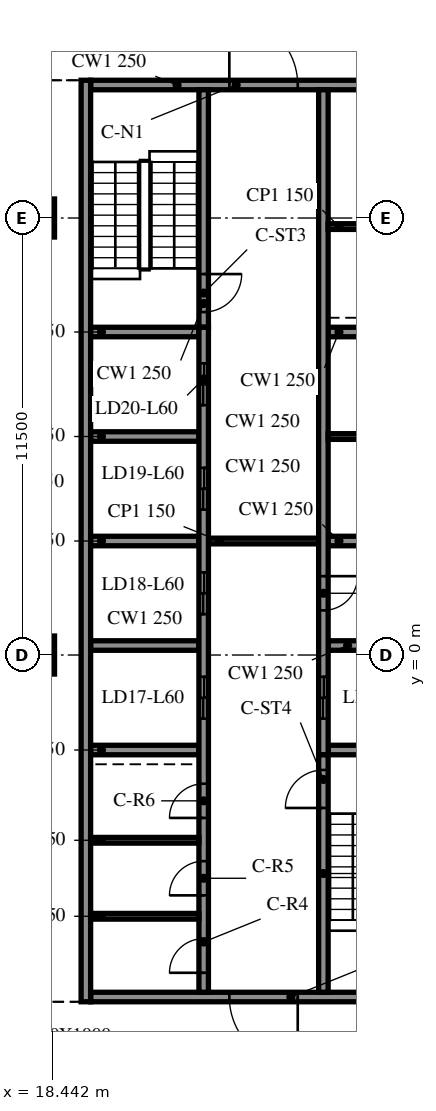
"""IFC4 building model, lengths in metres.
Left out: names, types, materials, properties, quantities, classifications, styles, units other than length and angle.
Written with IfcOpenShell. Run it as: python <this file> out.ifc"""

import sys

from ifc_helpers import new_model, si_unit, direction, frame, frame_2d, origin, origin_2d, place, context, subcontext, project, spatial, rectangle, extrude, element, fill, save


model = new_model("IFC4")
c1 = context("Model", 3, precision=1e-05, world=origin(), true_north=direction((0.0, 1.0)))
c2 = subcontext(c1, "Body", "Model", "MODEL_VIEW")
j1 = project(units=[si_unit("LENGTHUNIT", "METRE"), si_unit("PLANEANGLEUNIT", "RADIAN")], contexts=[c1])
p1 = place(None, origin())
s1 = spatial("IfcSite", under=j1, at=p1, CompositionType="ELEMENT")
p2 = place(p1, origin())
s2 = spatial("IfcBuilding", under=s1, at=p2, CompositionType="ELEMENT")
p3 = place(p2, frame((0.0, 0.0, 247.6)))
s3 = spatial("IfcBuildingStorey", under=s2, at=p3, CompositionType="ELEMENT", Elevation=247.6)
for number, where, z_axis, x_axis in (
    (1, (18.0, 0.0, -0.34), (0.0, 0.0, 1.0), (1.0, 0.0, 0.0)),
    (2, (18.0, 11.5, -0.34), (0.0, 0.0, 1.0), (1.0, 0.0, 0.0)),
):
    element("IfcColumn", number, at=place(p3, frame(where, z_axis=z_axis, x_axis=x_axis)), inside=s3, PredefinedType="COLUMN", context=c2, shape_type="SweptSolid", body=[
        extrude(rectangle(XDim=1.0, YDim=1.0, at=origin_2d()), origin(), (0.0, 0.0, 1.0), 3.8),
    ])
p4 = place(p3, frame((19.325, 15.125, 0.0), z_axis=(0.0, 0.0, 1.0), x_axis=(0.0, -1.0, 0.0)))
e3 = element("IfcWall", 3, at=p4, inside=s3, PredefinedType="SOLIDWALL", context=c2, shape_type="SweptSolid", body=[
    extrude(rectangle(XDim=24.25, YDim=0.25, at=frame_2d((12.125, 0.0))), origin(), (0.0, 0.0, 1.0), 3.46),
])
p5 = place(p3, frame((28.55, -9.0, 0.0), z_axis=(0.0, 0.0, 1.0), x_axis=(-1.0, 0.0, 0.0)))
e4 = element("IfcWall", 4, at=p5, inside=s3, PredefinedType="SOLIDWALL", context=c2, shape_type="SweptSolid", body=[
    extrude(rectangle(XDim=9.1, YDim=0.25, at=frame_2d((4.55, 0.0))), origin(), (0.0, 0.0, 1.0), 3.46),
])
p6 = place(p5, frame((3.65, 0.0, 0.0)))
e5 = element("IfcOpeningElement", 5, at=p6, cuts=e4, PredefinedType="OPENING", context=c2, shape_type="SweptSolid", body=[
    extrude(rectangle(XDim=1.8, YDim=2.1, at=frame_2d((0.9, 1.05))), frame((0.0, 0.135, 0.0), z_axis=(0.0, -1.0, 0.0), x_axis=(1.0, 0.0, 0.0)), (0.0, 0.0, 1.0), 0.27),
])
p7 = place(p3, frame((19.45, 15.0, 0.0), z_axis=(0.0, 0.0, 1.0), x_axis=(1.0, 0.0, 0.0)))
e6 = element("IfcWall", 6, at=p7, inside=s3, PredefinedType="SOLIDWALL", context=c2, shape_type="SweptSolid", body=[
    extrude(rectangle(XDim=9.1, YDim=0.25, at=frame_2d((4.55, 0.0))), origin(), (0.0, 0.0, 1.0), 3.46),
])
p8 = place(p7, frame((3.65, 0.0, 0.0)))
e7 = element("IfcOpeningElement", 7, at=p8, cuts=e6, PredefinedType="OPENING", context=c2, shape_type="SweptSolid", body=[
    extrude(rectangle(XDim=1.8, YDim=2.1, at=frame_2d((0.9, 1.05))), frame((0.0, 0.135, 0.0), z_axis=(0.0, -1.0, 0.0), x_axis=(1.0, 0.0, 0.0)), (0.0, 0.0, 1.0), 0.27),
])
p9 = place(p3, frame((22.425, -8.875, 0.0), z_axis=(0.0, 0.0, 1.0), x_axis=(0.0, 1.0, 0.0)))
e8 = element("IfcWall", 8, at=p9, inside=s3, PredefinedType="SOLIDWALL", context=c2, shape_type="SweptSolid", body=[
    extrude(rectangle(XDim=17.5, YDim=0.25, at=frame_2d((8.75, 0.0))), origin(), (0.0, 0.0, 1.0), 3.46),
])
p10 = place(p9, frame((7.2, 0.0, 0.0)))
e9 = element("IfcOpeningElement", 9, at=p10, cuts=e8, PredefinedType="OPENING", context=c2, shape_type="SweptSolid", body=[
    extrude(rectangle(XDim=1.1, YDim=2.1, at=frame_2d((0.55, 1.05))), frame((0.0, 0.135, 0.0), z_axis=(0.0, -1.0, 0.0), x_axis=(1.0, 0.0, 0.0)), (0.0, 0.0, 1.0), 0.27),
])
p11 = place(p9, frame((9.95, 0.0, 0.0)))
e10 = element("IfcOpeningElement", 10, at=p11, cuts=e8, PredefinedType="OPENING", context=c2, shape_type="SweptSolid", body=[
    extrude(rectangle(XDim=1.1, YDim=2.1, at=frame_2d((0.55, 1.05))), frame((0.0, 0.135, 0.0), z_axis=(0.0, -1.0, 0.0), x_axis=(1.0, 0.0, 0.0)), (0.0, 0.0, 1.0), 0.27),
])
p12 = place(p9, frame((12.7, 0.0, 0.0)))
e11 = element("IfcOpeningElement", 11, at=p12, cuts=e8, PredefinedType="OPENING", context=c2, shape_type="SweptSolid", body=[
    extrude(rectangle(XDim=1.1, YDim=2.1, at=frame_2d((0.55, 1.05))), frame((0.0, 0.135, 0.0), z_axis=(0.0, -1.0, 0.0), x_axis=(1.0, 0.0, 0.0)), (0.0, 0.0, 1.0), 0.27),
])
p13 = place(p9, frame((15.45, 0.0, 0.0)))
e12 = element("IfcOpeningElement", 12, at=p13, cuts=e8, PredefinedType="OPENING", context=c2, shape_type="SweptSolid", body=[
    extrude(rectangle(XDim=1.1, YDim=2.1, at=frame_2d((0.55, 1.05))), frame((0.0, 0.135, 0.0), z_axis=(0.0, -1.0, 0.0), x_axis=(1.0, 0.0, 0.0)), (0.0, 0.0, 1.0), 0.27),
])
p14 = place(p9, frame((0.512, 0.0, 0.0)))
e13 = element("IfcOpeningElement", 13, at=p14, cuts=e8, PredefinedType="OPENING", context=c2, shape_type="SweptSolid", body=[
    extrude(rectangle(XDim=0.9, YDim=2.1, at=frame_2d((0.45, 1.05))), frame((0.0, 0.135, 0.0), z_axis=(0.0, -1.0, 0.0), x_axis=(1.0, 0.0, 0.0)), (0.0, 0.0, 1.0), 0.27),
])
p15 = place(p9, frame((2.55, 0.0, 0.0)))
e14 = element("IfcOpeningElement", 14, at=p15, cuts=e8, PredefinedType="OPENING", context=c2, shape_type="SweptSolid", body=[
    extrude(rectangle(XDim=0.9, YDim=2.1, at=frame_2d((0.45, 1.05))), frame((0.0, 0.135, 0.0), z_axis=(0.0, -1.0, 0.0), x_axis=(1.0, 0.0, 0.0)), (0.0, 0.0, 1.0), 0.27),
])
p16 = place(p9, frame((4.587, 0.0, 0.0)))
e15 = element("IfcOpeningElement", 15, at=p16, cuts=e8, PredefinedType="OPENING", context=c2, shape_type="SweptSolid", body=[
    extrude(rectangle(XDim=0.9, YDim=2.1, at=frame_2d((0.45, 1.05))), frame((0.0, 0.135, 0.0), z_axis=(0.0, -1.0, 0.0), x_axis=(1.0, 0.0, 0.0)), (0.0, 0.0, 1.0), 0.27),
])
p17 = place(p3, frame((22.425, 14.875, 0.0), z_axis=(0.0, 0.0, 1.0), x_axis=(0.0, -1.0, 0.0)))
e16 = element("IfcWall", 16, at=p17, inside=s3, PredefinedType="SOLIDWALL", context=c2, shape_type="SweptSolid", body=[
    extrude(rectangle(XDim=6.25, YDim=0.25, at=frame_2d((3.125, 0.0))), origin(), (0.0, 0.0, 1.0), 3.46),
])
p18 = place(p17, frame((4.85, 0.0, 0.0)))
e17 = element("IfcOpeningElement", 17, at=p18, cuts=e16, PredefinedType="OPENING", context=c2, shape_type="SweptSolid", body=[
    extrude(rectangle(XDim=1.0, YDim=2.1, at=frame_2d((0.5, 1.05))), frame((0.0, 0.135, 0.0), z_axis=(0.0, -1.0, 0.0), x_axis=(1.0, 0.0, 0.0)), (0.0, 0.0, 1.0), 0.27),
])
p19 = place(p3, frame((25.575, -8.875, 0.0), z_axis=(0.0, 0.0, 1.0), x_axis=(0.0, 1.0, 0.0)))
e18 = element("IfcWall", 18, at=p19, inside=s3, PredefinedType="SOLIDWALL", context=c2, shape_type="SweptSolid", body=[
    extrude(rectangle(XDim=6.25, YDim=0.25, at=frame_2d((3.125, 0.0))), origin(), (0.0, 0.0, 1.0), 3.46),
])
p20 = place(p19, frame((4.85, 0.0, 0.0)))
e19 = element("IfcOpeningElement", 19, at=p20, cuts=e18, PredefinedType="OPENING", context=c2, shape_type="SweptSolid", body=[
    extrude(rectangle(XDim=1.0, YDim=2.1, at=frame_2d((0.5, 1.05))), frame((0.0, 0.135, 0.0), z_axis=(0.0, -1.0, 0.0), x_axis=(1.0, 0.0, 0.0)), (0.0, 0.0, 1.0), 0.27),
])
p21 = place(p3, frame((25.575, 14.875, 0.0), z_axis=(0.0, 0.0, 1.0), x_axis=(0.0, -1.0, 0.0)))
e20 = element("IfcWall", 20, at=p21, inside=s3, PredefinedType="SOLIDWALL", context=c2, shape_type="SweptSolid", body=[
    extrude(rectangle(XDim=17.5, YDim=0.25, at=frame_2d((8.75, 0.0))), origin(), (0.0, 0.0, 1.0), 3.46),
])
p22 = place(p21, frame((15.45, 0.0, 0.0)))
e21 = element("IfcOpeningElement", 21, at=p22, cuts=e20, PredefinedType="OPENING", context=c2, shape_type="SweptSolid", body=[
    extrude(rectangle(XDim=1.1, YDim=2.1, at=frame_2d((0.55, 1.05))), frame((0.0, 0.135, 0.0), z_axis=(0.0, -1.0, 0.0), x_axis=(1.0, 0.0, 0.0)), (0.0, 0.0, 1.0), 0.27),
])
p23 = place(p21, frame((12.8, 0.0, 0.0)))
e22 = element("IfcOpeningElement", 22, at=p23, cuts=e20, PredefinedType="OPENING", context=c2, shape_type="SweptSolid", body=[
    extrude(rectangle(XDim=0.9, YDim=2.1, at=frame_2d((0.45, 1.05))), frame((0.0, 0.135, 0.0), z_axis=(0.0, -1.0, 0.0), x_axis=(1.0, 0.0, 0.0)), (0.0, 0.0, 1.0), 0.27),
])
for number, where, z_axis, x_axis in (
    (23, (19.45, -2.5, 0.0), (0.0, 0.0, 1.0), (1.0, 0.0, 0.0)),
    (24, (19.45, 0.25, 0.0), (0.0, 0.0, 1.0), (1.0, 0.0, 0.0)),
    (25, (19.45, 3.0, 0.0), (0.0, 0.0, 1.0), (1.0, 0.0, 0.0)),
    (26, (19.45, 5.75, 0.0), (0.0, 0.0, 1.0), (1.0, 0.0, 0.0)),
    (27, (19.45, 8.5, 0.0), (0.0, 0.0, 1.0), (1.0, 0.0, 0.0)),
    (28, (25.7, -2.5, 0.0), (0.0, 0.0, 1.0), (1.0, 0.0, 0.0)),
    (29, (25.7, 0.25, 0.0), (0.0, 0.0, 1.0), (1.0, 0.0, 0.0)),
    (30, (25.7, 3.0, 0.0), (0.0, 0.0, 1.0), (1.0, 0.0, 0.0)),
    (31, (25.7, 8.5, 0.0), (0.0, 0.0, 1.0), (1.0, 0.0, 0.0)),
):
    element("IfcWall", number, at=place(p3, frame(where, z_axis=z_axis, x_axis=x_axis)), inside=s3, PredefinedType="SOLIDWALL", context=c2, shape_type="SweptSolid", body=[
        extrude(rectangle(XDim=2.85, YDim=0.25, at=frame_2d((1.425, 0.0))), origin(), (0.0, 0.0, 1.0), 3.46),
    ])
p24 = place(p3, frame((22.55, 3.0, 0.0), z_axis=(0.0, 0.0, 1.0), x_axis=(1.0, 0.0, 0.0)))
e32 = element("IfcWall", 32, at=p24, inside=s3, PredefinedType="PARTITIONING", context=c2, shape_type="SweptSolid", body=[
    extrude(rectangle(XDim=2.9, YDim=0.15, at=frame_2d((1.45, 0.0))), origin(), (0.0, 0.0, 1.0), 3.46),
])
for number, where, z_axis, x_axis in (
    (33, (25.7, 5.75, 0.0), (0.0, 0.0, 1.0), (1.0, 0.0, 0.0)),
    (34, (19.45, -6.875, 0.0), (0.0, 0.0, 1.0), (1.0, 0.0, 0.0)),
    (35, (19.45, -4.875, 0.0), (0.0, 0.0, 1.0), (1.0, 0.0, 0.0)),
    (36, (25.7, 11.275, 0.0), (0.0, 0.0, 1.0), (1.0, 0.0, 0.0)),
):
    element("IfcWall", number, at=place(p3, frame(where, z_axis=z_axis, x_axis=x_axis)), inside=s3, PredefinedType="PARTITIONING", context=c2, shape_type="SweptSolid", body=[
        extrude(rectangle(XDim=2.85, YDim=0.15, at=frame_2d((1.425, 0.0))), origin(), (0.0, 0.0, 1.0), 3.46),
    ])
p25 = place(p6, origin())
e37 = element("IfcDoor", 37, at=p25, inside=s3, OperationType="DOUBLE_DOOR_SINGLE_SWING", PredefinedType="DOOR", context=c2, shape_type="SweptSolid", body=[
    extrude(rectangle(XDim=1.8, YDim=2.1, at=frame_2d((0.9, 1.05))), frame((0.0, 0.025, 0.0), z_axis=(0.0, -1.0, 0.0), x_axis=(1.0, 0.0, 0.0)), (0.0, 0.0, 1.0), 0.05),
])
fill(e5, e37)
p26 = place(p8, origin())
e38 = element("IfcDoor", 38, at=p26, inside=s3, OperationType="DOUBLE_DOOR_SINGLE_SWING", PredefinedType="DOOR", context=c2, shape_type="SweptSolid", body=[
    extrude(rectangle(XDim=1.8, YDim=2.1, at=frame_2d((0.9, 1.05))), frame((0.0, 0.025, 0.0), z_axis=(0.0, -1.0, 0.0), x_axis=(1.0, 0.0, 0.0)), (0.0, 0.0, 1.0), 0.05),
])
fill(e7, e38)
p27 = place(p22, origin())
e39 = element("IfcDoor", 39, at=p27, inside=s3, OperationType="DOUBLE_DOOR_SLIDING", PredefinedType="DOOR", context=c2, shape_type="SweptSolid", body=[
    extrude(rectangle(XDim=1.1, YDim=2.1, at=frame_2d((0.55, 1.05))), frame((0.0, 0.025, 0.0), z_axis=(0.0, -1.0, 0.0), x_axis=(1.0, 0.0, 0.0)), (0.0, 0.0, 1.0), 0.05),
])
fill(e21, e39)
p28 = place(p10, origin())
e40 = element("IfcDoor", 40, at=p28, inside=s3, OperationType="DOUBLE_DOOR_SLIDING", PredefinedType="DOOR", context=c2, shape_type="SweptSolid", body=[
    extrude(rectangle(XDim=1.1, YDim=2.1, at=frame_2d((0.55, 1.05))), frame((0.0, 0.025, 0.0), z_axis=(0.0, -1.0, 0.0), x_axis=(1.0, 0.0, 0.0)), (0.0, 0.0, 1.0), 0.05),
])
fill(e9, e40)
p29 = place(p11, origin())
e41 = element("IfcDoor", 41, at=p29, inside=s3, OperationType="DOUBLE_DOOR_SLIDING", PredefinedType="DOOR", context=c2, shape_type="SweptSolid", body=[
    extrude(rectangle(XDim=1.1, YDim=2.1, at=frame_2d((0.55, 1.05))), frame((0.0, 0.025, 0.0), z_axis=(0.0, -1.0, 0.0), x_axis=(1.0, 0.0, 0.0)), (0.0, 0.0, 1.0), 0.05),
])
fill(e10, e41)
p30 = place(p12, origin())
e42 = element("IfcDoor", 42, at=p30, inside=s3, OperationType="DOUBLE_DOOR_SLIDING", PredefinedType="DOOR", context=c2, shape_type="SweptSolid", body=[
    extrude(rectangle(XDim=1.1, YDim=2.1, at=frame_2d((0.55, 1.05))), frame((0.0, 0.025, 0.0), z_axis=(0.0, -1.0, 0.0), x_axis=(1.0, 0.0, 0.0)), (0.0, 0.0, 1.0), 0.05),
])
fill(e11, e42)
p31 = place(p13, origin())
e43 = element("IfcDoor", 43, at=p31, inside=s3, OperationType="DOUBLE_DOOR_SLIDING", PredefinedType="DOOR", context=c2, shape_type="SweptSolid", body=[
    extrude(rectangle(XDim=1.1, YDim=2.1, at=frame_2d((0.55, 1.05))), frame((0.0, 0.025, 0.0), z_axis=(0.0, -1.0, 0.0), x_axis=(1.0, 0.0, 0.0)), (0.0, 0.0, 1.0), 0.05),
])
fill(e12, e43)
p32 = place(p23, origin())
e44 = element("IfcDoor", 44, at=p32, inside=s3, OperationType="SINGLE_SWING_LEFT", PredefinedType="DOOR", context=c2, shape_type="SweptSolid", body=[
    extrude(rectangle(XDim=0.9, YDim=2.1, at=frame_2d((0.45, 1.05))), frame((0.0, 0.025, 0.0), z_axis=(0.0, -1.0, 0.0), x_axis=(1.0, 0.0, 0.0)), (0.0, 0.0, 1.0), 0.05),
])
fill(e22, e44)
p33 = place(p14, origin())
e45 = element("IfcDoor", 45, at=p33, inside=s3, OperationType="SINGLE_SWING_RIGHT", PredefinedType="DOOR", context=c2, shape_type="SweptSolid", body=[
    extrude(rectangle(XDim=0.9, YDim=2.1, at=frame_2d((0.45, 1.05))), frame((0.0, 0.025, 0.0), z_axis=(0.0, -1.0, 0.0), x_axis=(1.0, 0.0, 0.0)), (0.0, 0.0, 1.0), 0.05),
])
fill(e13, e45)
p34 = place(p15, origin())
e46 = element("IfcDoor", 46, at=p34, inside=s3, OperationType="SINGLE_SWING_LEFT", PredefinedType="DOOR", context=c2, shape_type="SweptSolid", body=[
    extrude(rectangle(XDim=0.9, YDim=2.1, at=frame_2d((0.45, 1.05))), frame((0.0, 0.025, 0.0), z_axis=(0.0, -1.0, 0.0), x_axis=(1.0, 0.0, 0.0)), (0.0, 0.0, 1.0), 0.05),
])
fill(e14, e46)
p35 = place(p16, origin())
e47 = element("IfcDoor", 47, at=p35, inside=s3, OperationType="SINGLE_SWING_RIGHT", PredefinedType="DOOR", context=c2, shape_type="SweptSolid", body=[
    extrude(rectangle(XDim=0.9, YDim=2.1, at=frame_2d((0.45, 1.05))), frame((0.0, 0.025, 0.0), z_axis=(0.0, -1.0, 0.0), x_axis=(1.0, 0.0, 0.0)), (0.0, 0.0, 1.0), 0.05),
])
fill(e15, e47)
p36 = place(p18, origin())
e48 = element("IfcDoor", 48, at=p36, inside=s3, OperationType="SINGLE_SWING_LEFT", PredefinedType="DOOR", context=c2, shape_type="SweptSolid", body=[
    extrude(rectangle(XDim=1.0, YDim=2.1, at=frame_2d((0.5, 1.05))), frame((0.0, 0.025, 0.0), z_axis=(0.0, -1.0, 0.0), x_axis=(1.0, 0.0, 0.0)), (0.0, 0.0, 1.0), 0.05),
])
fill(e17, e48)
p37 = place(p20, origin())
e49 = element("IfcDoor", 49, at=p37, inside=s3, OperationType="SINGLE_SWING_RIGHT", PredefinedType="DOOR", context=c2, shape_type="SweptSolid", body=[
    extrude(rectangle(XDim=1.0, YDim=2.1, at=frame_2d((0.5, 1.05))), frame((0.0, 0.025, 0.0), z_axis=(0.0, -1.0, 0.0), x_axis=(1.0, 0.0, 0.0)), (0.0, 0.0, 1.0), 0.05),
])
fill(e19, e49)
save(model, sys.argv[1])
